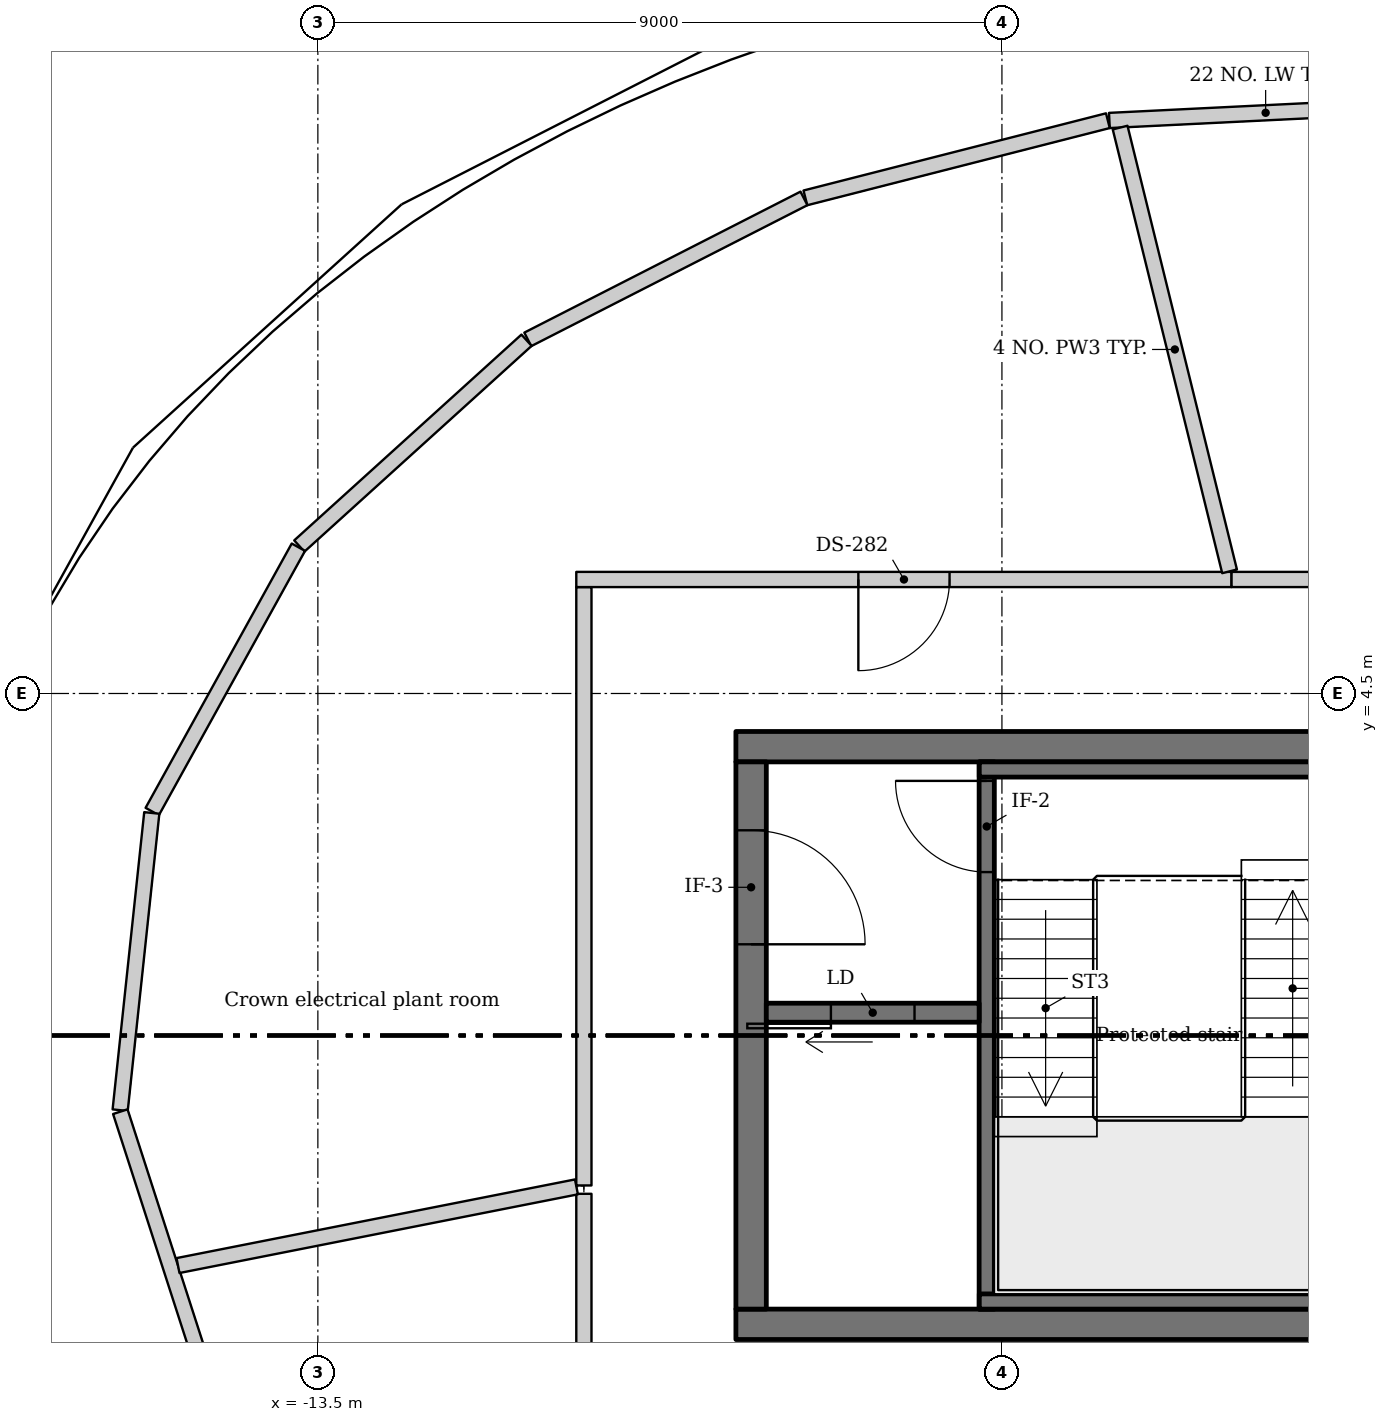
"""IFC4 building model, lengths in metres.
Left out: names, types, materials, properties, quantities, classifications, styles, units other than length and angle.
Written with IfcOpenShell. Run it as: python <this file> out.ifc"""

import sys

from ifc_helpers import new_model, si_unit, direction, frame, frame_2d, origin, place, context, subcontext, project, spatial, rectangle, extrude, source, transform, mapped, element, fill, save


model = new_model("IFC4")
c1 = context("Model", 3, precision=1e-05, world=origin(), true_north=direction((0.0, 1.0)))
c2 = subcontext(c1, "Body", "Model", "MODEL_VIEW")
j1 = project(units=[si_unit("LENGTHUNIT", "METRE"), si_unit("PLANEANGLEUNIT", "RADIAN")], contexts=[c1])
p1 = place(None, origin())
s1 = spatial("IfcSite", under=j1, at=p1, CompositionType="ELEMENT")
p2 = place(p1, origin())
s2 = spatial("IfcBuilding", under=s1, at=p2, CompositionType="ELEMENT")
p3 = place(p2, frame((0.0, 0.0, 356.5)))
s3 = spatial("IfcBuildingStorey", under=s2, at=p3, CompositionType="ELEMENT", Elevation=356.5)
m1 = source(origin(), c2, "Body", "SweptSolid", [
    extrude(rectangle(XDim=16.0, YDim=0.4, at=frame_2d((8.0, 0.0))), origin(), (0.0, 0.0, 1.0), 4.25),
])
for number, where, z_axis, x_axis in (
    (1, (-8.0, 3.8, 0.0), (0.0, 0.0, 1.0), (1.0, 0.0, 0.0)),
    (2, (-8.0, -3.8, 0.0), (0.0, 0.0, 1.0), (1.0, 0.0, 0.0)),
):
    element("IfcWall", number, at=place(p3, frame(where, z_axis=z_axis, x_axis=x_axis)), inside=s3, PredefinedType="SHEAR", context=c2, shape_type="MappedRepresentation", body=[
        mapped(m1, transform((0.0, 0.0, 0.0))),
    ])
m2 = source(origin(), c2, "Body", "SweptSolid", [
    extrude(rectangle(XDim=7.2, YDim=0.4, at=frame_2d((3.6, 0.0))), origin(), (0.0, 0.0, 1.0), 4.25),
])
p4 = place(p3, frame((-7.8, -3.6, 0.0), z_axis=(0.0, 0.0, 1.0), x_axis=(0.0, 1.0, 0.0)))
e3 = element("IfcWall", 3, at=p4, inside=s3, PredefinedType="SHEAR", context=c2, shape_type="MappedRepresentation", body=[
    mapped(m2, transform((0.0, 0.0, 0.0))),
])
m3 = source(origin(), c2, "Body", "SweptSolid", [
    extrude(rectangle(XDim=1.5, YDim=2.1, at=frame_2d((0.75, 1.05))), frame((0.0, 0.21, 0.0), z_axis=(0.0, -1.0, 0.0), x_axis=(1.0, 0.0, 0.0)), (0.0, 0.0, 1.0), 0.42),
])
p5 = place(p4, frame((4.8, 0.0, 0.0)))
e4 = element("IfcOpeningElement", 4, at=p5, cuts=e3, PredefinedType="OPENING", context=c2, shape_type="MappedRepresentation", body=[
    mapped(m3, transform((0.0, 0.0, 0.0))),
])
m4 = source(origin(), c2, "Body", "SweptSolid", [
    extrude(rectangle(XDim=4.116, YDim=0.2, at=frame_2d((2.058, 0.0))), origin(), (0.0, 0.0, 1.0), 4.25),
])
p6 = place(p3, frame((-3.086, 12.04, 0.0), z_axis=(0.0, 0.0, 1.0), x_axis=(0.998790641863, 0.049165574616, 0.0)))
e5 = element("IfcWall", 5, at=p6, inside=s3, PredefinedType="SOLIDWALL", context=c2, shape_type="MappedRepresentation", body=[
    mapped(m4, transform((0.0, 0.0, 0.0))),
])
m5 = source(origin(), c2, "Body", "SweptSolid", [
    extrude(rectangle(XDim=4.107, YDim=0.2, at=frame_2d((2.054, 0.0))), origin(), (0.0, 0.0, 1.0), 4.25),
])
p7 = place(p3, frame((-7.086, 11.021, 0.0), z_axis=(0.0, 0.0, 1.0), x_axis=(0.96894922759, 0.247259770996, 0.0)))
e6 = element("IfcWall", 6, at=p7, inside=s3, PredefinedType="SOLIDWALL", context=c2, shape_type="MappedRepresentation", body=[
    mapped(m5, transform((0.0, 0.0, 0.0))),
])
m6 = source(origin(), c2, "Body", "SweptSolid", [
    extrude(rectangle(XDim=4.08, YDim=0.2, at=frame_2d((2.04, 0.0))), origin(), (0.0, 0.0, 1.0), 4.25),
])
p8 = place(p3, frame((-10.738, 9.159, 0.0), z_axis=(0.0, 0.0, 1.0), x_axis=(0.89066198265, 0.454666067198, 0.0)))
e7 = element("IfcWall", 7, at=p8, inside=s3, PredefinedType="SOLIDWALL", context=c2, shape_type="MappedRepresentation", body=[
    mapped(m6, transform((0.0, 0.0, 0.0))),
])
m7 = source(origin(), c2, "Body", "SweptSolid", [
    extrude(rectangle(XDim=4.033, YDim=0.2, at=frame_2d((2.017, 0.0))), origin(), (0.0, 0.0, 1.0), 4.25),
])
p9 = place(p3, frame((-13.744, 6.44, 0.0), z_axis=(0.0, 0.0, 1.0), x_axis=(0.741168574023, 0.671318959125, 0.0)))
e8 = element("IfcWall", 8, at=p9, inside=s3, PredefinedType="SOLIDWALL", context=c2, shape_type="MappedRepresentation", body=[
    mapped(m7, transform((0.0, 0.0, 0.0))),
])
m8 = source(origin(), c2, "Body", "SweptSolid", [
    extrude(rectangle(XDim=3.974, YDim=0.2, at=frame_2d((1.987, 0.0))), origin(), (0.0, 0.0, 1.0), 4.25),
])
p10 = place(p3, frame((-15.679, 2.947, 0.0), z_axis=(0.0, 0.0, 1.0), x_axis=(0.483910254113, 0.875117629787, 0.0)))
e9 = element("IfcWall", 9, at=p10, inside=s3, PredefinedType="SOLIDWALL", context=c2, shape_type="MappedRepresentation", body=[
    mapped(m8, transform((0.0, 0.0, 0.0))),
])
m9 = source(origin(), c2, "Body", "SweptSolid", [
    extrude(rectangle(XDim=3.933, YDim=0.2, at=frame_2d((1.966, 0.0))), origin(), (0.0, 0.0, 1.0), 4.25),
])
p11 = place(p3, frame((-16.101, -0.983, 0.0), z_axis=(0.0, 0.0, 1.0), x_axis=(0.10577691274, 0.994389885674, 0.0)))
e10 = element("IfcWall", 10, at=p11, inside=s3, PredefinedType="SOLIDWALL", context=c2, shape_type="MappedRepresentation", body=[
    mapped(m9, transform((0.0, 0.0, 0.0))),
])
m10 = source(origin(), c2, "Body", "SweptSolid", [
    extrude(rectangle(XDim=3.948, YDim=0.2, at=frame_2d((1.974, 0.0))), origin(), (0.0, 0.0, 1.0), 4.25),
])
p12 = place(p3, frame((-14.885, -4.76, 0.0), z_axis=(0.0, 0.0, 1.0), x_axis=(-0.307365880997, 0.951591411898, 0.0)))
e11 = element("IfcWall", 11, at=p12, inside=s3, PredefinedType="SOLIDWALL", context=c2, shape_type="MappedRepresentation", body=[
    mapped(m10, transform((0.0, 0.0, 0.0))),
])
m11 = source(origin(), c2, "Body", "SweptSolid", [
    extrude(rectangle(XDim=7.2, YDim=0.2, at=frame_2d((3.6, 0.0))), origin(), (0.0, 0.0, 1.0), 4.25),
])
p13 = place(p3, frame((-4.7, 3.6, 0.0), z_axis=(0.0, 0.0, 1.0), x_axis=(0.0, -1.0, 0.0)))
e12 = element("IfcWall", 12, at=p13, inside=s3, PredefinedType="SHEAR", context=c2, shape_type="MappedRepresentation", body=[
    mapped(m11, transform((0.0, 0.0, 0.0))),
])
m12 = source(origin(), c2, "Body", "SweptSolid", [
    extrude(rectangle(XDim=1.2, YDim=2.1, at=frame_2d((0.6, 1.05))), frame((0.0, 0.11, 0.0), z_axis=(0.0, -1.0, 0.0), x_axis=(1.0, 0.0, 0.0)), (0.0, 0.0, 1.0), 0.22),
])
p14 = place(p13, frame((0.25, 0.0, 0.0)))
e13 = element("IfcOpeningElement", 13, at=p14, cuts=e12, PredefinedType="OPENING", context=c2, shape_type="MappedRepresentation", body=[
    mapped(m12, transform((0.0, 0.0, 0.0))),
])
m13 = source(origin(), c2, "Body", "SweptSolid", [
    extrude(rectangle(XDim=2.8, YDim=0.25, at=frame_2d((1.4, 0.0))), origin(), (0.0, 0.0, 1.0), 4.25),
])
p15 = place(p3, frame((-4.8, 0.3, 0.0), z_axis=(0.0, 0.0, 1.0), x_axis=(-1.0, 0.0, 0.0)))
e14 = element("IfcWall", 14, at=p15, inside=s3, PredefinedType="SHEAR", context=c2, shape_type="MappedRepresentation", body=[
    mapped(m13, transform((0.0, 0.0, 0.0))),
])
m14 = source(origin(), c2, "Body", "SweptSolid", [
    extrude(rectangle(XDim=1.1, YDim=2.1, at=frame_2d((0.55, 1.05))), frame((0.0, 0.135, 0.0), z_axis=(0.0, -1.0, 0.0), x_axis=(1.0, 0.0, 0.0)), (0.0, 0.0, 1.0), 0.27),
])
p16 = place(p15, frame((0.85, 0.0, 0.0)))
e15 = element("IfcOpeningElement", 15, at=p16, cuts=e14, PredefinedType="OPENING", context=c2, shape_type="MappedRepresentation", body=[
    mapped(m14, transform((0.0, 0.0, 0.0))),
])
m15 = source(origin(), c2, "Body", "SweptSolid", [
    extrude(rectangle(XDim=9.596, YDim=0.2, at=frame_2d((4.798, 0.0))), origin(), (0.0, 0.0, 1.0), 4.25),
])
for number, where, z_axis, x_axis in (
    (16, (-4.798, -3.5, 0.0), (0.0, 0.0, 1.0), (1.0, 0.0, 0.0)),
    (17, (4.798, 3.5, 0.0), (0.0, 0.0, 1.0), (-1.0, 0.0, 0.0)),
):
    element("IfcWall", number, at=place(p3, frame(where, z_axis=z_axis, x_axis=x_axis)), inside=s3, PredefinedType="SHEAR", context=c2, shape_type="MappedRepresentation", body=[
        mapped(m15, transform((0.0, 0.0, 0.0))),
    ])
m16 = source(origin(), c2, "Body", "SweptSolid", [
    extrude(rectangle(XDim=3.817, YDim=0.2, at=frame_2d((1.908, 0.0))), origin(), (0.0, 0.0, 1.0), 4.25),
])
p17 = place(p3, frame((-10.0, -5.9, 0.0), z_axis=(0.0, 0.0, 1.0), x_axis=(0.0, 1.0, 0.0)))
e18 = element("IfcWall", 18, at=p17, inside=s3, PredefinedType="PARTITIONING", context=c2, shape_type="MappedRepresentation", body=[
    mapped(m16, transform((0.0, 0.0, 0.0))),
])
m17 = source(origin(), c2, "Body", "SweptSolid", [
    extrude(rectangle(XDim=5.344, YDim=0.2, at=frame_2d((2.672, 0.0))), origin(), (0.0, 0.0, 1.0), 4.25),
])
p18 = place(p3, frame((-10.098, -1.992, 0.0), z_axis=(0.0, 0.0, 1.0), x_axis=(-0.981055750952, -0.193725614011, 0.0)))
e19 = element("IfcWall", 19, at=p18, inside=s3, PredefinedType="PARTITIONING", context=c2, shape_type="MappedRepresentation", body=[
    mapped(m17, transform((0.0, 0.0, 0.0))),
])
m18 = source(origin(), c2, "Body", "SweptSolid", [
    extrude(rectangle(XDim=7.873, YDim=0.2, at=frame_2d((3.937, 0.0))), origin(), (0.0, 0.0, 1.0), 4.25),
])
p19 = place(p3, frame((-10.0, -1.973, 0.0), z_axis=(0.0, 0.0, 1.0), x_axis=(0.0, 1.0, 0.0)))
e20 = element("IfcWall", 20, at=p19, inside=s3, PredefinedType="PARTITIONING", context=c2, shape_type="MappedRepresentation", body=[
    mapped(m18, transform((0.0, 0.0, 0.0))),
])
m19 = source(origin(), c2, "Body", "SweptSolid", [
    extrude(rectangle(XDim=8.621, YDim=0.2, at=frame_2d((4.311, 0.0))), origin(), (0.0, 0.0, 1.0), 4.25),
])
p20 = place(p3, frame((-10.1, 6.0, 0.0), z_axis=(0.0, 0.0, 1.0), x_axis=(1.0, 0.0, 0.0)))
e21 = element("IfcWall", 21, at=p20, inside=s3, PredefinedType="PARTITIONING", context=c2, shape_type="MappedRepresentation", body=[
    mapped(m19, transform((0.0, 0.0, 0.0))),
])
p21 = place(p20, frame((3.711, 0.0, 0.0)))
e22 = element("IfcOpeningElement", 22, at=p21, cuts=e21, PredefinedType="OPENING", context=c2, shape_type="MappedRepresentation", body=[
    mapped(m12, transform((0.0, 0.0, 0.0))),
])
m20 = source(origin(), c2, "Body", "SweptSolid", [
    extrude(rectangle(XDim=6.014, YDim=0.2, at=frame_2d((3.007, 0.0))), origin(), (0.0, 0.0, 1.0), 4.25),
])
p22 = place(p3, frame((-1.505, 6.107, 0.0), z_axis=(0.0, 0.0, 1.0), x_axis=(-0.239468317603, 0.970904179033, 0.0)))
e23 = element("IfcWall", 23, at=p22, inside=s3, PredefinedType="PARTITIONING", context=c2, shape_type="MappedRepresentation", body=[
    mapped(m20, transform((0.0, 0.0, 0.0))),
])
m21 = source(origin(), c2, "Body", "SweptSolid", [
    extrude(rectangle(XDim=11.579, YDim=0.2, at=frame_2d((5.79, 0.0))), origin(), (0.0, 0.0, 1.0), 4.25),
])
p23 = place(p3, frame((-1.479, 6.0, 0.0), z_axis=(0.0, 0.0, 1.0), x_axis=(1.0, 0.0, 0.0)))
e24 = element("IfcWall", 24, at=p23, inside=s3, PredefinedType="PARTITIONING", context=c2, shape_type="MappedRepresentation", body=[
    mapped(m21, transform((0.0, 0.0, 0.0))),
])
p24 = place(p23, frame((5.189, 0.0, 0.0)))
e25 = element("IfcOpeningElement", 25, at=p24, cuts=e24, PredefinedType="OPENING", context=c2, shape_type="MappedRepresentation", body=[
    mapped(m12, transform((0.0, 0.0, 0.0))),
])
m22 = source(origin(), c2, "Body", "SweptSolid", [
    extrude(rectangle(XDim=1.1, YDim=2.1, at=frame_2d((0.55, 1.05))), frame((0.0, 0.025, 0.0), z_axis=(0.0, -1.0, 0.0), x_axis=(1.0, 0.0, 0.0)), (0.0, 0.0, 1.0), 0.05),
])
p25 = place(p16, origin())
e26 = element("IfcDoor", 26, at=p25, inside=s3, OperationType="SLIDING_TO_RIGHT", PredefinedType="DOOR", context=c2, shape_type="MappedRepresentation", body=[
    mapped(m22, transform((0.0, 0.0, 0.0))),
])
fill(e15, e26)
m23 = source(origin(), c2, "Body", "SweptSolid", [
    extrude(rectangle(XDim=1.2, YDim=2.1, at=frame_2d((0.6, 1.05))), frame((0.0, 0.025, 0.0), z_axis=(0.0, -1.0, 0.0), x_axis=(1.0, 0.0, 0.0)), (0.0, 0.0, 1.0), 0.05),
])
p26 = place(p14, origin())
e27 = element("IfcDoor", 27, at=p26, inside=s3, OperationType="SINGLE_SWING_RIGHT", PredefinedType="DOOR", context=c2, shape_type="MappedRepresentation", body=[
    mapped(m23, transform((0.0, 0.0, 0.0))),
])
fill(e13, e27)
m24 = source(origin(), c2, "Body", "SweptSolid", [
    extrude(rectangle(XDim=1.5, YDim=2.1, at=frame_2d((0.75, 1.05))), frame((0.0, 0.025, 0.0), z_axis=(0.0, -1.0, 0.0), x_axis=(1.0, 0.0, 0.0)), (0.0, 0.0, 1.0), 0.05),
])
p27 = place(p5, origin())
e28 = element("IfcDoor", 28, at=p27, inside=s3, OperationType="DOUBLE_DOOR_SINGLE_SWING", PredefinedType="DOOR", context=c2, shape_type="MappedRepresentation", body=[
    mapped(m24, transform((0.0, 0.0, 0.0))),
])
fill(e4, e28)
m25 = source(origin(), c2, "Body", "SweptSolid", [
    extrude(rectangle(XDim=1.2, YDim=2.1, at=frame_2d((0.6, 1.05))), frame((0.0, 0.025, 0.0), z_axis=(0.0, -1.0, 0.0), x_axis=(1.0, 0.0, 0.0)), (0.0, 0.0, 1.0), 0.05),
])
p28 = place(p21, origin())
e29 = element("IfcDoor", 29, at=p28, inside=s3, OperationType="SINGLE_SWING_LEFT", PredefinedType="DOOR", context=c2, shape_type="MappedRepresentation", body=[
    mapped(m25, transform((0.0, 0.0, 0.0))),
])
fill(e22, e29)
save(model, sys.argv[1])
